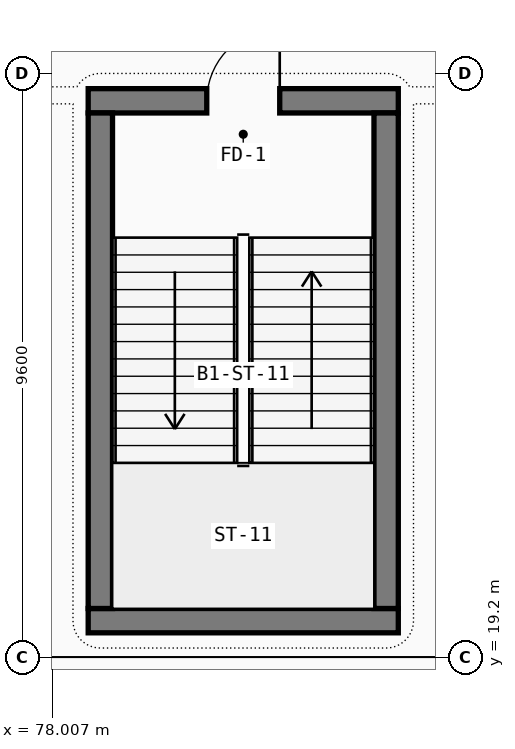
"""IFC4 building model, lengths in metres.
Left out: names, types, materials, properties, quantities, classifications, styles, units other than length and angle.
Written with IfcOpenShell. Run it as: python <this file> out.ifc"""

import sys

from ifc_helpers import new_model, si_unit, direction, frame, frame_2d, origin, place, context, subcontext, project, spatial, rectangle, extrude, element, fill, save


model = new_model("IFC4")
c1 = context("Model", 3, precision=1e-05, world=origin(), true_north=direction((0.0, 1.0)))
c2 = subcontext(c1, "Body", "Model", "MODEL_VIEW")
j1 = project(units=[si_unit("LENGTHUNIT", "METRE"), si_unit("PLANEANGLEUNIT", "RADIAN")], contexts=[c1])
p1 = place(None, origin())
s1 = spatial("IfcSite", under=j1, at=p1, CompositionType="ELEMENT")
p2 = place(p1, origin())
s2 = spatial("IfcBuilding", under=s1, at=p2, CompositionType="ELEMENT")
p3 = place(p2, frame((0.0, 0.0, -4.8)))
s3 = spatial("IfcBuildingStorey", under=s2, at=p3, CompositionType="ELEMENT", Elevation=-4.8)
p4 = place(p3, frame((78.6, 19.8, 0.0), z_axis=(0.0, 0.0, 1.0), x_axis=(1.0, 0.0, 0.0)))
e1 = element("IfcWall", 1, at=p4, inside=s3, PredefinedType="SHEAR", context=c2, shape_type="SweptSolid", body=[
    extrude(rectangle(XDim=5.1, YDim=0.4, at=frame_2d((2.55, 0.0))), origin(), (0.0, 0.0, 1.0), 4.5),
])
p5 = place(p3, frame((83.7, 28.35, 0.0), z_axis=(0.0, 0.0, 1.0), x_axis=(-1.0, 0.0, 0.0)))
e2 = element("IfcWall", 2, at=p5, inside=s3, PredefinedType="SHEAR", context=c2, shape_type="SweptSolid", body=[
    extrude(rectangle(XDim=5.1, YDim=0.4, at=frame_2d((2.55, 0.0))), origin(), (0.0, 0.0, 1.0), 4.5),
])
p6 = place(p5, frame((3.15, 0.0, 0.0), z_axis=(0.0, 0.0, 1.0), x_axis=(-1.0, 0.0, 0.0)))
e3 = element("IfcOpeningElement", 3, at=p6, cuts=e2, PredefinedType="OPENING", context=c2, shape_type="SweptSolid", body=[
    extrude(rectangle(XDim=1.2, YDim=2.2, at=frame_2d((0.6, 1.1))), frame((0.0, 0.21, 0.0), z_axis=(0.0, -1.0, 0.0), x_axis=(1.0, 0.0, 0.0)), (0.0, 0.0, 1.0), 0.42),
])
for number, where, z_axis, x_axis in (
    (4, (78.8, 28.15, 0.0), (0.0, 0.0, 1.0), (0.0, -1.0, 0.0)),
    (5, (83.5, 20.0, 0.0), (0.0, 0.0, 1.0), (0.0, 1.0, 0.0)),
):
    element("IfcWall", number, at=place(p3, frame(where, z_axis=z_axis, x_axis=x_axis)), inside=s3, PredefinedType="SHEAR", context=c2, shape_type="SweptSolid", body=[
        extrude(rectangle(XDim=8.15, YDim=0.4, at=frame_2d((4.075, 0.0))), origin(), (0.0, 0.0, 1.0), 4.5),
    ])
p7 = place(p6, origin())
e6 = element("IfcDoor", 6, at=p7, inside=s3, OperationType="SINGLE_SWING_RIGHT", PredefinedType="DOOR", context=c2, shape_type="SweptSolid", body=[
    extrude(rectangle(XDim=1.2, YDim=2.2, at=frame_2d((0.6, 1.1))), frame((0.0, 0.025, 0.0), z_axis=(0.0, -1.0, 0.0), x_axis=(1.0, 0.0, 0.0)), (0.0, 0.0, 1.0), 0.05),
])
fill(e3, e6)
save(model, sys.argv[1])
